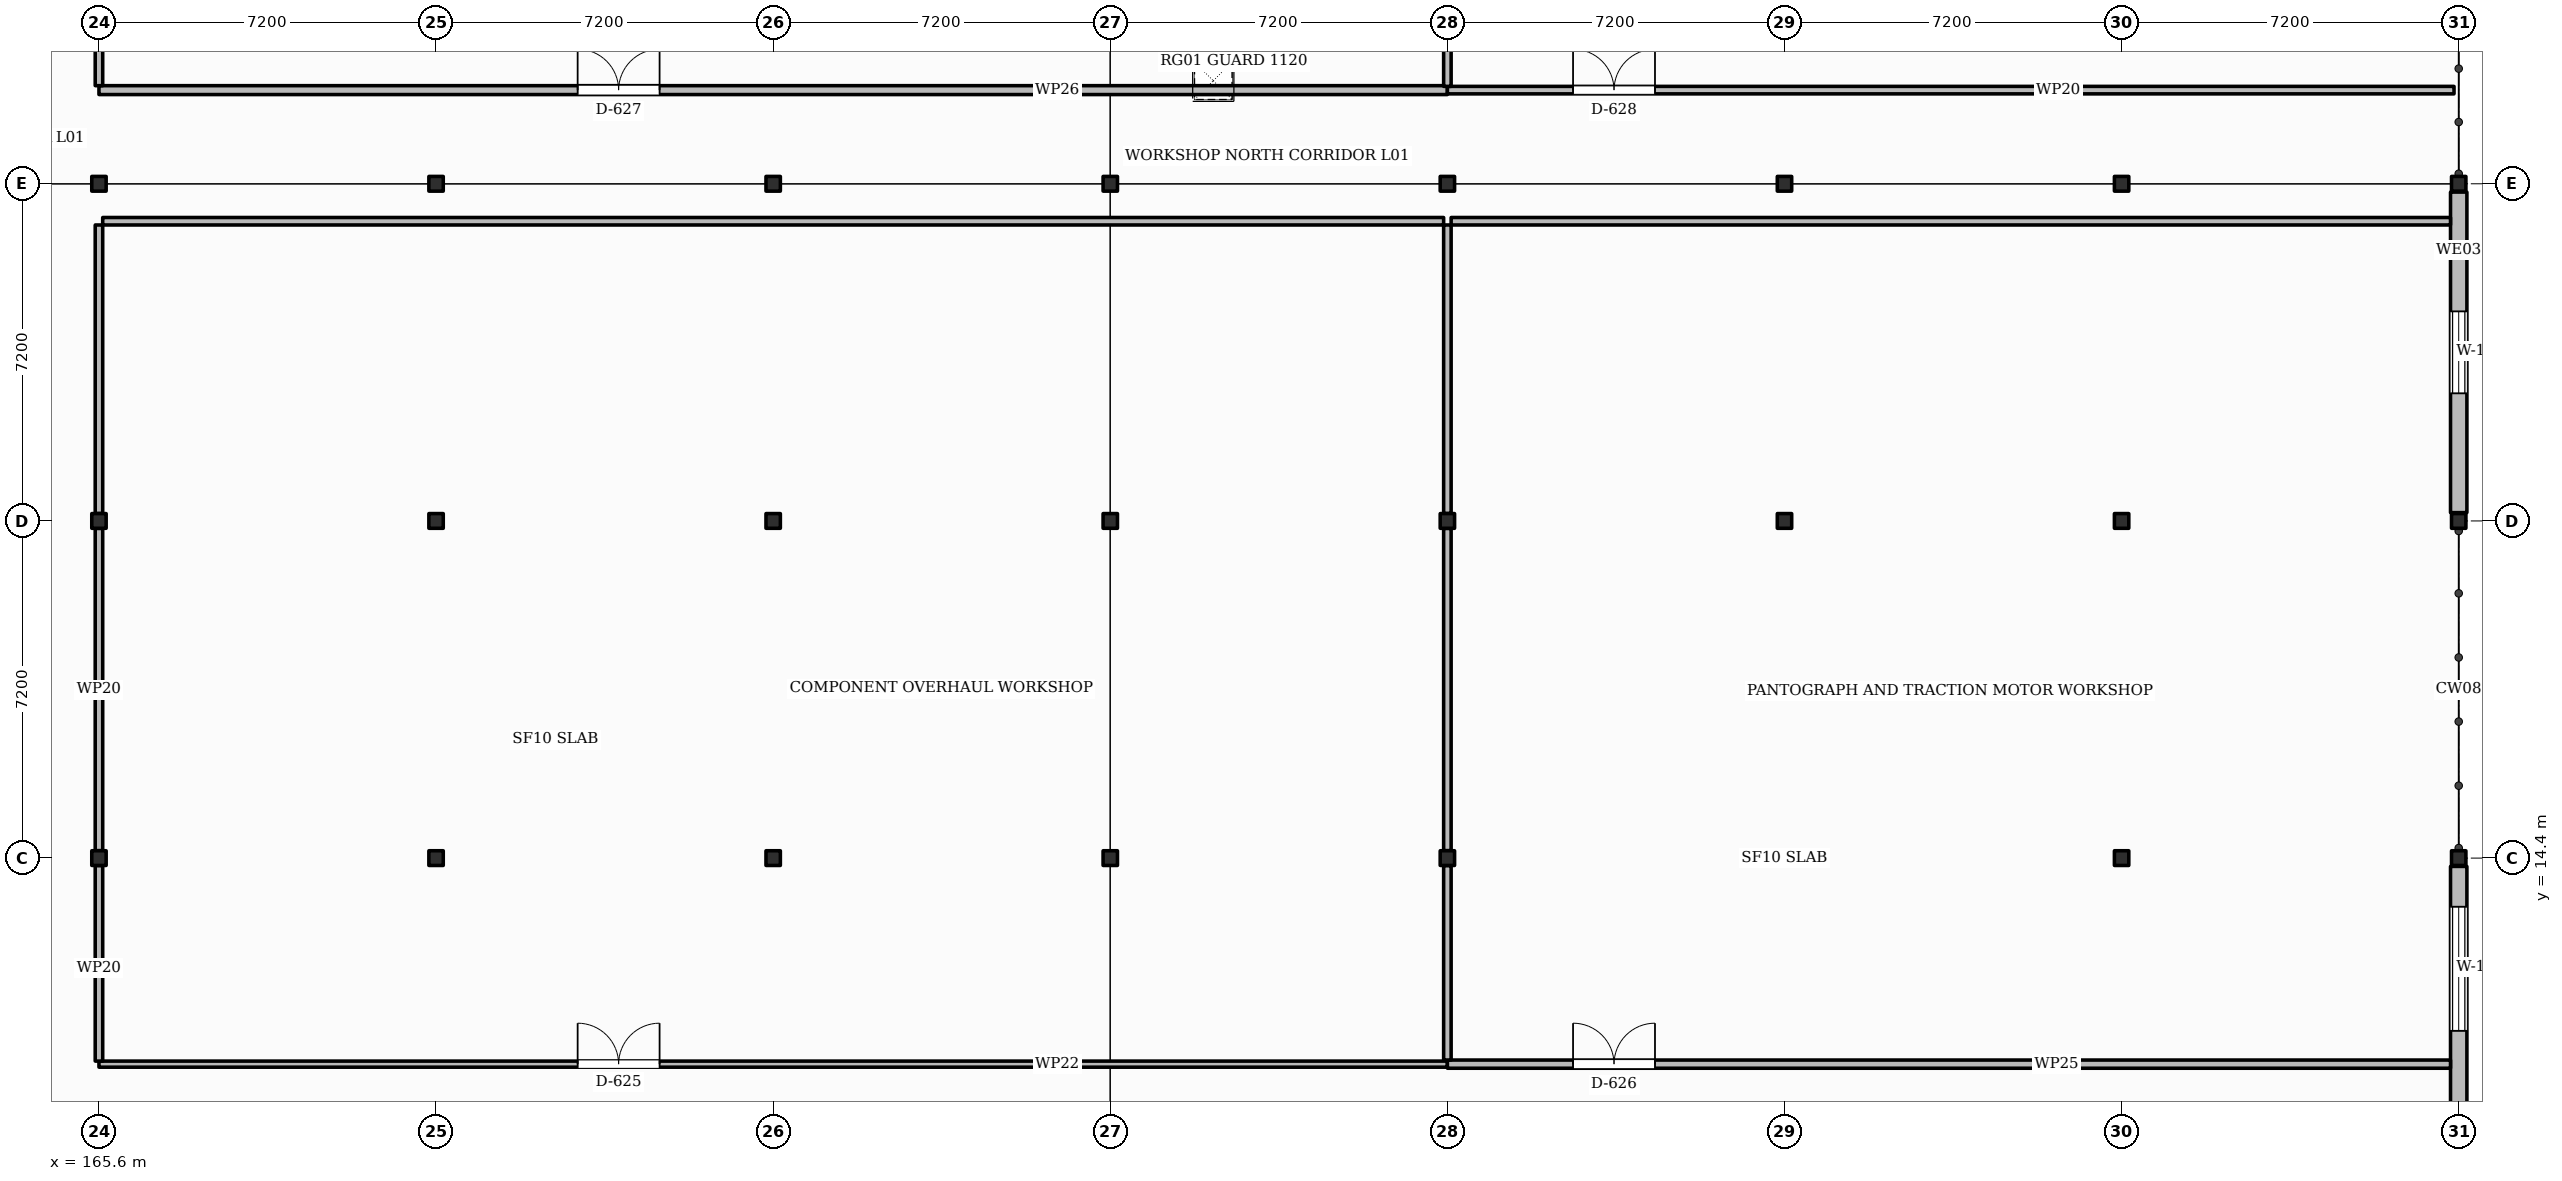
"""IFC4 building model, lengths in metres.
Left out: names, types, materials, properties, quantities, classifications, styles, units other than length and angle.
Written with IfcOpenShell. Run it as: python <this file> out.ifc"""

import sys

from ifc_helpers import new_model, si_unit, direction, frame, frame_2d, origin, origin_2d, place, context, subcontext, project, spatial, rectangle, i_section, extrude, element, fill, save


model = new_model("IFC4")
c1 = context("Model", 3, precision=1e-05, world=origin(), true_north=direction((0.0, 1.0)))
c2 = subcontext(c1, "Body", "Model", "MODEL_VIEW")
j1 = project(units=[si_unit("LENGTHUNIT", "METRE"), si_unit("PLANEANGLEUNIT", "RADIAN")], contexts=[c1])
p1 = place(None, origin())
s1 = spatial("IfcSite", under=j1, at=p1, CompositionType="ELEMENT")
p2 = place(p1, origin())
s2 = spatial("IfcBuilding", under=s1, at=p2, CompositionType="ELEMENT")
p3 = place(p2, frame((0.0, 0.0, 5.4)))
s3 = spatial("IfcBuildingStorey", under=s2, at=p3, CompositionType="ELEMENT", Elevation=5.4)
for number, where, z_axis, x_axis in (
    (1, (165.6, 14.4, 0.0), (0.0, 0.0, 1.0), (1.0, 0.0, 0.0)),
    (2, (165.6, 21.6, 0.0), (0.0, 0.0, 1.0), (1.0, 0.0, 0.0)),
    (3, (165.6, 28.8, 0.0), (0.0, 0.0, 1.0), (1.0, 0.0, 0.0)),
    (4, (172.8, 14.4, 0.0), (0.0, 0.0, 1.0), (1.0, 0.0, 0.0)),
    (5, (172.8, 21.6, 0.0), (0.0, 0.0, 1.0), (1.0, 0.0, 0.0)),
    (6, (172.8, 28.8, 0.0), (0.0, 0.0, 1.0), (1.0, 0.0, 0.0)),
    (7, (180.0, 14.4, 0.0), (0.0, 0.0, 1.0), (1.0, 0.0, 0.0)),
    (8, (180.0, 21.6, 0.0), (0.0, 0.0, 1.0), (1.0, 0.0, 0.0)),
    (9, (180.0, 28.8, 0.0), (0.0, 0.0, 1.0), (1.0, 0.0, 0.0)),
    (10, (187.2, 14.4, 0.0), (0.0, 0.0, 1.0), (1.0, 0.0, 0.0)),
    (11, (187.2, 21.6, 0.0), (0.0, 0.0, 1.0), (1.0, 0.0, 0.0)),
    (12, (187.2, 28.8, 0.0), (0.0, 0.0, 1.0), (1.0, 0.0, 0.0)),
    (13, (194.4, 14.4, 0.0), (0.0, 0.0, 1.0), (1.0, 0.0, 0.0)),
    (14, (194.4, 21.6, 0.0), (0.0, 0.0, 1.0), (1.0, 0.0, 0.0)),
    (15, (194.4, 28.8, 0.0), (0.0, 0.0, 1.0), (1.0, 0.0, 0.0)),
    (16, (201.6, 14.4, 0.0), (0.0, 0.0, 1.0), (1.0, 0.0, 0.0)),
    (17, (201.6, 21.6, 0.0), (0.0, 0.0, 1.0), (1.0, 0.0, 0.0)),
    (18, (201.6, 28.8, 0.0), (0.0, 0.0, 1.0), (1.0, 0.0, 0.0)),
    (19, (208.8, 14.4, 0.0), (0.0, 0.0, 1.0), (1.0, 0.0, 0.0)),
    (20, (208.8, 21.6, 0.0), (0.0, 0.0, 1.0), (1.0, 0.0, 0.0)),
    (21, (208.8, 28.8, 0.0), (0.0, 0.0, 1.0), (1.0, 0.0, 0.0)),
    (22, (216.0, 14.4, 0.0), (0.0, 0.0, 1.0), (1.0, 0.0, 0.0)),
    (23, (216.0, 21.6, 0.0), (0.0, 0.0, 1.0), (1.0, 0.0, 0.0)),
    (24, (216.0, 28.8, 0.0), (0.0, 0.0, 1.0), (1.0, 0.0, 0.0)),
):
    element("IfcColumn", number, at=place(p3, frame(where, z_axis=z_axis, x_axis=x_axis)), inside=s3, PredefinedType="COLUMN", context=c2, shape_type="SweptSolid", body=[
        extrude(i_section(OverallWidth=0.307, OverallDepth=0.314, WebThickness=0.012, FlangeThickness=0.019, FilletRadius=0.015, at=origin_2d()), origin(), (0.0, 0.0, 1.0), 4.5),
    ])
p4 = place(p3, frame((216.0, 28.623, 0.0), z_axis=(0.0, 0.0, 1.0), x_axis=(0.0, -1.0, 0.0)))
e25 = element("IfcWall", 25, at=p4, inside=s3, PredefinedType="SOLIDWALL", context=c2, shape_type="SweptSolid", body=[
    extrude(rectangle(XDim=6.845, YDim=0.35, at=frame_2d((3.423, 0.0))), origin(), (0.0, 0.0, 1.0), 3.493),
])
p5 = place(p4, frame((2.548, 0.0, 1.05)))
e26 = element("IfcOpeningElement", 26, at=p5, cuts=e25, PredefinedType="OPENING", context=c2, shape_type="SweptSolid", body=[
    extrude(rectangle(XDim=1.75, YDim=1.85, at=frame_2d((0.875, 0.925))), frame((0.0, 0.185, 0.0), z_axis=(0.0, -1.0, 0.0), x_axis=(1.0, 0.0, 0.0)), (0.0, 0.0, 1.0), 0.37),
])
p6 = place(p3, frame((216.0, 14.223, 0.0), z_axis=(0.0, 0.0, 1.0), x_axis=(0.0, -1.0, 0.0)))
e27 = element("IfcWall", 27, at=p6, inside=s3, PredefinedType="SOLIDWALL", context=c2, shape_type="SweptSolid", body=[
    extrude(rectangle(XDim=6.845, YDim=0.35, at=frame_2d((3.423, 0.0))), origin(), (0.0, 0.0, 1.0), 3.493),
])
p7 = place(p6, frame((0.861, 0.0, 1.05)))
e28 = element("IfcOpeningElement", 28, at=p7, cuts=e27, PredefinedType="OPENING", context=c2, shape_type="SweptSolid", body=[
    extrude(rectangle(XDim=2.65, YDim=1.6, at=frame_2d((1.325, 0.8))), frame((0.0, 0.185, 0.0), z_axis=(0.0, -1.0, 0.0), x_axis=(1.0, 0.0, 0.0)), (0.0, 0.0, 1.0), 0.37),
])
p8 = place(p3, frame((165.6, 10.0, 0.0), z_axis=(0.0, 0.0, 1.0), x_axis=(1.0, 0.0, 0.0)))
e29 = element("IfcWall", 29, at=p8, inside=s3, PredefinedType="PARTITIONING", context=c2, shape_type="SweptSolid", body=[
    extrude(rectangle(XDim=28.8, YDim=0.13, at=frame_2d((14.4, 0.0))), origin(), (0.0, 0.0, 1.0), 3.488),
])
p9 = place(p8, frame((10.224, 0.0, 0.0)))
e30 = element("IfcOpeningElement", 30, at=p9, cuts=e29, PredefinedType="OPENING", context=c2, shape_type="SweptSolid", body=[
    extrude(rectangle(XDim=1.75, YDim=2.25, at=frame_2d((0.875, 1.125))), frame((0.0, 0.075, 0.0), z_axis=(0.0, -1.0, 0.0), x_axis=(1.0, 0.0, 0.0)), (0.0, 0.0, 1.0), 0.15),
])
p10 = place(p3, frame((194.4, 10.0, 0.0), z_axis=(0.0, 0.0, 1.0), x_axis=(1.0, 0.0, 0.0)))
e31 = element("IfcWall", 31, at=p10, inside=s3, PredefinedType="PARTITIONING", context=c2, shape_type="SweptSolid", body=[
    extrude(rectangle(XDim=21.425, YDim=0.175, at=frame_2d((10.712, 0.0))), origin(), (0.0, 0.0, 1.0), 3.488),
])
p11 = place(p10, frame((2.684, 0.0, 0.0)))
e32 = element("IfcOpeningElement", 32, at=p11, cuts=e31, PredefinedType="OPENING", context=c2, shape_type="SweptSolid", body=[
    extrude(rectangle(XDim=1.75, YDim=2.25, at=frame_2d((0.875, 1.125))), frame((0.0, 0.097, 0.0), z_axis=(0.0, -1.0, 0.0), x_axis=(1.0, 0.0, 0.0)), (0.0, 0.0, 1.0), 0.195),
])
p12 = place(p3, frame((165.6, 30.8, 0.0), z_axis=(0.0, 0.0, 1.0), x_axis=(1.0, 0.0, 0.0)))
e33 = element("IfcWall", 33, at=p12, inside=s3, PredefinedType="PARTITIONING", context=c2, shape_type="SweptSolid", body=[
    extrude(rectangle(XDim=28.8, YDim=0.19, at=frame_2d((14.4, 0.0))), origin(), (0.0, 0.0, 1.0), 3.488),
])
p13 = place(p12, frame((10.224, 0.0, 0.0)))
e34 = element("IfcOpeningElement", 34, at=p13, cuts=e33, PredefinedType="OPENING", context=c2, shape_type="SweptSolid", body=[
    extrude(rectangle(XDim=1.75, YDim=2.25, at=frame_2d((0.875, 1.125))), frame((0.0, 0.105, 0.0), z_axis=(0.0, -1.0, 0.0), x_axis=(1.0, 0.0, 0.0)), (0.0, 0.0, 1.0), 0.21),
])
p14 = place(p3, frame((194.4, 30.8, 0.0), z_axis=(0.0, 0.0, 1.0), x_axis=(1.0, 0.0, 0.0)))
e35 = element("IfcWall", 35, at=p14, inside=s3, PredefinedType="PARTITIONING", context=c2, shape_type="SweptSolid", body=[
    extrude(rectangle(XDim=21.5, YDim=0.16, at=frame_2d((10.75, 0.0))), origin(), (0.0, 0.0, 1.0), 3.488),
])
p15 = place(p14, frame((2.684, 0.0, 0.0)))
e36 = element("IfcOpeningElement", 36, at=p15, cuts=e35, PredefinedType="OPENING", context=c2, shape_type="SweptSolid", body=[
    extrude(rectangle(XDim=1.75, YDim=2.25, at=frame_2d((0.875, 1.125))), frame((0.0, 0.09, 0.0), z_axis=(0.0, -1.0, 0.0), x_axis=(1.0, 0.0, 0.0)), (0.0, 0.0, 1.0), 0.18),
])
p16 = place(p3, frame((165.6, 10.065, 0.0), z_axis=(0.0, 0.0, 1.0), x_axis=(0.0, 1.0, 0.0)))
e37 = element("IfcWall", 37, at=p16, inside=s3, PredefinedType="PARTITIONING", context=c2, shape_type="SweptSolid", body=[
    extrude(rectangle(XDim=4.176, YDim=0.16, at=frame_2d((2.088, 0.0))), origin(), (0.0, 0.0, 1.0), 3.528),
])
p17 = place(p3, frame((165.6, 14.559, 0.0), z_axis=(0.0, 0.0, 1.0), x_axis=(0.0, 1.0, 0.0)))
e38 = element("IfcWall", 38, at=p17, inside=s3, PredefinedType="PARTITIONING", context=c2, shape_type="SweptSolid", body=[
    extrude(rectangle(XDim=6.882, YDim=0.16, at=frame_2d((3.441, 0.0))), origin(), (0.0, 0.0, 1.0), 3.528),
])
p18 = place(p3, frame((165.6, 21.759, 0.0), z_axis=(0.0, 0.0, 1.0), x_axis=(0.0, 1.0, 0.0)))
e39 = element("IfcWall", 39, at=p18, inside=s3, PredefinedType="PARTITIONING", context=c2, shape_type="SweptSolid", body=[
    extrude(rectangle(XDim=6.161, YDim=0.16, at=frame_2d((3.081, 0.0))), origin(), (0.0, 0.0, 1.0), 3.528),
])
p19 = place(p3, frame((194.4, 10.088, 0.0), z_axis=(0.0, 0.0, 1.0), x_axis=(0.0, 1.0, 0.0)))
e40 = element("IfcWall", 40, at=p19, inside=s3, PredefinedType="PARTITIONING", context=c2, shape_type="SweptSolid", body=[
    extrude(rectangle(XDim=4.153, YDim=0.16, at=frame_2d((2.077, 0.0))), origin(), (0.0, 0.0, 1.0), 3.488),
])
p20 = place(p3, frame((194.4, 14.559, 0.0), z_axis=(0.0, 0.0, 1.0), x_axis=(0.0, 1.0, 0.0)))
e41 = element("IfcWall", 41, at=p20, inside=s3, PredefinedType="PARTITIONING", context=c2, shape_type="SweptSolid", body=[
    extrude(rectangle(XDim=6.882, YDim=0.16, at=frame_2d((3.441, 0.0))), origin(), (0.0, 0.0, 1.0), 3.488),
])
p21 = place(p3, frame((194.4, 21.759, 0.0), z_axis=(0.0, 0.0, 1.0), x_axis=(0.0, 1.0, 0.0)))
e42 = element("IfcWall", 42, at=p21, inside=s3, PredefinedType="PARTITIONING", context=c2, shape_type="SweptSolid", body=[
    extrude(rectangle(XDim=6.161, YDim=0.16, at=frame_2d((3.081, 0.0))), origin(), (0.0, 0.0, 1.0), 3.488),
])
p22 = place(p3, frame((165.68, 28.0, 0.0), z_axis=(0.0, 0.0, 1.0), x_axis=(1.0, 0.0, 0.0)))
e43 = element("IfcWall", 43, at=p22, inside=s3, PredefinedType="PARTITIONING", context=c2, shape_type="SweptSolid", body=[
    extrude(rectangle(XDim=28.64, YDim=0.16, at=frame_2d((14.32, 0.0))), origin(), (0.0, 0.0, 1.0), 3.488),
])
p23 = place(p3, frame((194.48, 28.0, 0.0), z_axis=(0.0, 0.0, 1.0), x_axis=(1.0, 0.0, 0.0)))
e44 = element("IfcWall", 44, at=p23, inside=s3, PredefinedType="PARTITIONING", context=c2, shape_type="SweptSolid", body=[
    extrude(rectangle(XDim=21.345, YDim=0.16, at=frame_2d((10.672, 0.0))), origin(), (0.0, 0.0, 1.0), 3.488),
])
p24 = place(p3, frame((165.6, 30.895, 0.0), z_axis=(0.0, 0.0, 1.0), x_axis=(0.0, 1.0, 0.0)))
e45 = element("IfcWall", 45, at=p24, inside=s3, PredefinedType="PARTITIONING", context=c2, shape_type="SweptSolid", body=[
    extrude(rectangle(XDim=4.946, YDim=0.16, at=frame_2d((2.473, 0.0))), origin(), (0.0, 0.0, 1.0), 3.528),
])
p25 = place(p3, frame((194.4, 30.88, 0.0), z_axis=(0.0, 0.0, 1.0), x_axis=(0.0, 1.0, 0.0)))
e46 = element("IfcWall", 46, at=p25, inside=s3, PredefinedType="PARTITIONING", context=c2, shape_type="SweptSolid", body=[
    extrude(rectangle(XDim=4.961, YDim=0.16, at=frame_2d((2.48, 0.0))), origin(), (0.0, 0.0, 1.0), 3.488),
])
p26 = place(p5, origin())
e47 = element("IfcWindow", 47, at=p26, inside=s3, PartitioningType="SINGLE_PANEL", PredefinedType="WINDOW", context=c2, shape_type="SweptSolid", body=[
    extrude(rectangle(XDim=1.75, YDim=1.85, at=frame_2d((0.875, 0.925))), frame((0.0, 0.03, 0.0), z_axis=(0.0, -1.0, 0.0), x_axis=(1.0, 0.0, 0.0)), (0.0, 0.0, 1.0), 0.06),
])
fill(e26, e47)
p27 = place(p7, origin())
e48 = element("IfcWindow", 48, at=p27, inside=s3, PartitioningType="SINGLE_PANEL", PredefinedType="WINDOW", context=c2, shape_type="SweptSolid", body=[
    extrude(rectangle(XDim=2.65, YDim=1.6, at=frame_2d((1.325, 0.8))), frame((0.0, 0.03, 0.0), z_axis=(0.0, -1.0, 0.0), x_axis=(1.0, 0.0, 0.0)), (0.0, 0.0, 1.0), 0.06),
])
fill(e28, e48)
p28 = place(p9, origin())
e49 = element("IfcDoor", 49, at=p28, inside=s3, OperationType="DOUBLE_SWING_LEFT", PredefinedType="DOOR", context=c2, shape_type="SweptSolid", body=[
    extrude(rectangle(XDim=1.75, YDim=2.25, at=frame_2d((0.875, 1.125))), frame((0.0, 0.025, 0.0), z_axis=(0.0, -1.0, 0.0), x_axis=(1.0, 0.0, 0.0)), (0.0, 0.0, 1.0), 0.05),
])
fill(e30, e49)
p29 = place(p11, origin())
e50 = element("IfcDoor", 50, at=p29, inside=s3, OperationType="DOUBLE_SWING_LEFT", PredefinedType="DOOR", context=c2, shape_type="SweptSolid", body=[
    extrude(rectangle(XDim=1.75, YDim=2.25, at=frame_2d((0.875, 1.125))), frame((0.0, 0.025, 0.0), z_axis=(0.0, -1.0, 0.0), x_axis=(1.0, 0.0, 0.0)), (0.0, 0.0, 1.0), 0.05),
])
fill(e32, e50)
p30 = place(p13, origin())
e51 = element("IfcDoor", 51, at=p30, inside=s3, OperationType="DOUBLE_SWING_LEFT", PredefinedType="DOOR", context=c2, shape_type="SweptSolid", body=[
    extrude(rectangle(XDim=1.75, YDim=2.25, at=frame_2d((0.875, 1.125))), frame((0.0, 0.025, 0.0), z_axis=(0.0, -1.0, 0.0), x_axis=(1.0, 0.0, 0.0)), (0.0, 0.0, 1.0), 0.05),
])
fill(e34, e51)
p31 = place(p15, origin())
e52 = element("IfcDoor", 52, at=p31, inside=s3, OperationType="DOUBLE_SWING_LEFT", PredefinedType="DOOR", context=c2, shape_type="SweptSolid", body=[
    extrude(rectangle(XDim=1.75, YDim=2.25, at=frame_2d((0.875, 1.125))), frame((0.0, 0.025, 0.0), z_axis=(0.0, -1.0, 0.0), x_axis=(1.0, 0.0, 0.0)), (0.0, 0.0, 1.0), 0.05),
])
fill(e36, e52)
save(model, sys.argv[1])
